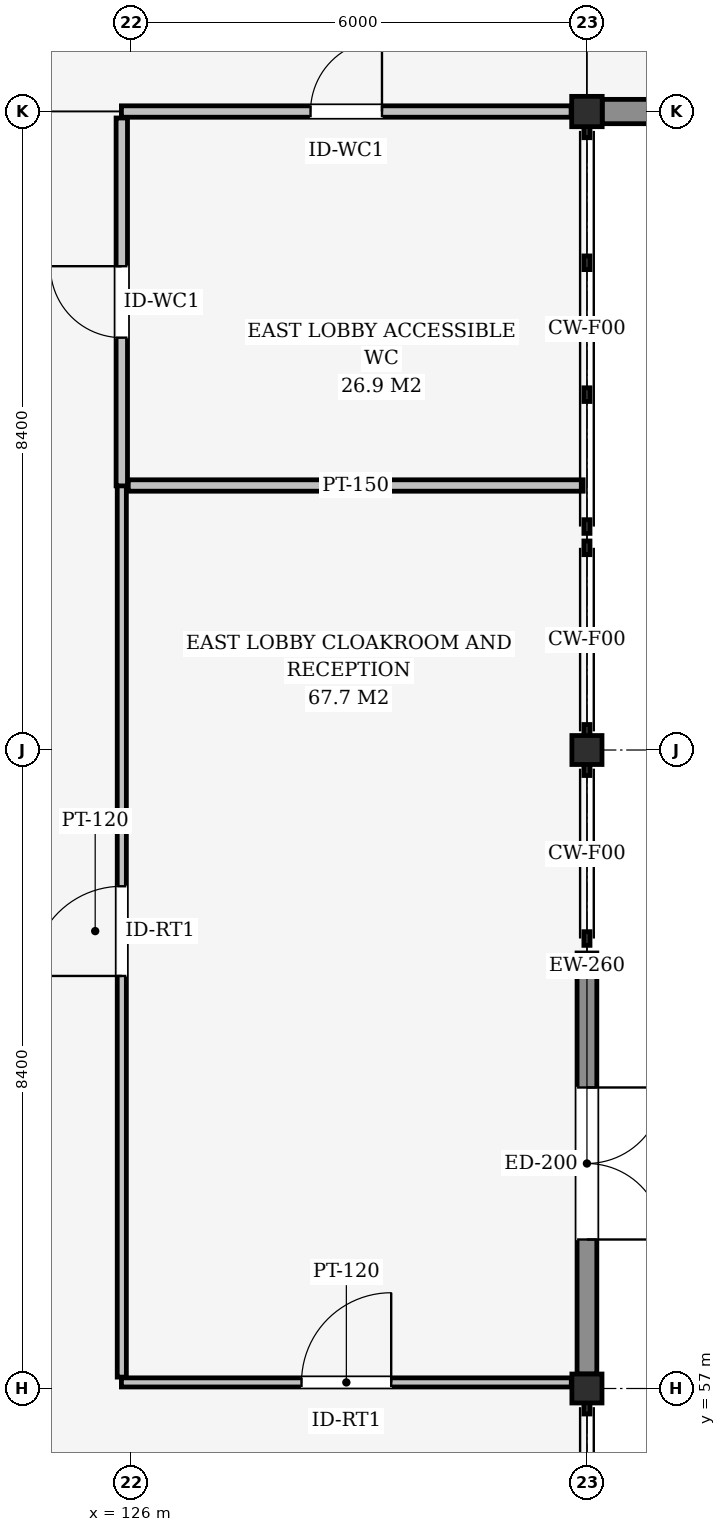
"""IFC4 building model, lengths in metres.
Left out: names, types, materials, properties, quantities, classifications, styles, units other than length and angle.
Written with IfcOpenShell. Run it as: python <this file> out.ifc"""

import sys

from ifc_helpers import new_model, si_unit, direction, frame, frame_2d, origin, origin_2d, place, context, subcontext, project, spatial, rectangle, i_section, extrude, element, fill, save


model = new_model("IFC4")
c1 = context("Model", 3, precision=1e-05, world=origin(), true_north=direction((0.0, 1.0)))
c2 = subcontext(c1, "Body", "Model", "MODEL_VIEW")
j1 = project(units=[si_unit("LENGTHUNIT", "METRE"), si_unit("PLANEANGLEUNIT", "RADIAN")], contexts=[c1])
p1 = place(None, origin())
s1 = spatial("IfcSite", under=j1, at=p1, CompositionType="ELEMENT")
p2 = place(p1, origin())
s2 = spatial("IfcBuilding", under=s1, at=p2, CompositionType="ELEMENT")
p3 = place(p2, origin())
s3 = spatial("IfcBuildingStorey", under=s2, at=p3, CompositionType="ELEMENT", Elevation=0.0)
p4 = place(p3, frame((132.0, 73.8, 0.0), z_axis=(0.0, 0.0, 1.0), x_axis=(1.0, 0.0, 0.0)))
e1 = element("IfcColumn", 1, at=p4, inside=s3, PredefinedType="COLUMN", context=c2, shape_type="SweptSolid", body=[
    extrude(i_section(OverallWidth=0.401, OverallDepth=0.399, WebThickness=0.025, FlangeThickness=0.04, at=origin_2d()), origin(), (0.0, 0.0, 1.0), 4.8),
])
for number, where, z_axis, x_axis in (
    (2, (132.0, 57.0, 0.0), (0.0, 0.0, 1.0), (1.0, 0.0, 0.0)),
    (3, (132.0, 65.4, 0.0), (0.0, 0.0, 1.0), (1.0, 0.0, 0.0)),
):
    element("IfcColumn", number, at=place(p3, frame(where, z_axis=z_axis, x_axis=x_axis)), inside=s3, PredefinedType="COLUMN", context=c2, shape_type="SweptSolid", body=[
        extrude(i_section(OverallWidth=0.396, OverallDepth=0.381, WebThickness=0.019, FlangeThickness=0.03, at=origin_2d()), origin(), (0.0, 0.0, 1.0), 4.8),
    ])
p5 = place(p3, frame((143.575, 73.8, 0.0), z_axis=(0.0, 0.0, 1.0), x_axis=(-1.0, 0.0, 0.0)))
e4 = element("IfcWall", 4, at=p5, inside=s3, PredefinedType="SOLIDWALL", context=c2, shape_type="SweptSolid", body=[
    extrude(rectangle(XDim=11.375, YDim=0.32, at=frame_2d((5.687, 0.0))), origin(), (0.0, 0.0, 1.0), 3.978),
])
p6 = place(p5, frame((4.687, 0.0, 0.0)))
e5 = element("IfcOpeningElement", 5, at=p6, cuts=e4, PredefinedType="OPENING", context=c2, shape_type="SweptSolid", body=[
    extrude(rectangle(XDim=2.0, YDim=2.4, at=frame_2d((1.0, 1.2))), frame((0.0, 0.17, 0.0), z_axis=(0.0, -1.0, 0.0), x_axis=(1.0, 0.0, 0.0)), (0.0, 0.0, 1.0), 0.34),
])
p7 = place(p3, frame((132.0, 62.73, 0.0), z_axis=(0.0, 0.0, 1.0), x_axis=(0.0, -1.0, 0.0)))
e6 = element("IfcWall", 6, at=p7, inside=s3, PredefinedType="SOLIDWALL", context=c2, shape_type="SweptSolid", body=[
    extrude(rectangle(XDim=5.54, YDim=0.26, at=frame_2d((2.77, 0.0))), origin(), (0.0, 0.0, 1.0), 3.828),
])
p8 = place(p7, frame((1.77, 0.0, 0.0)))
e7 = element("IfcOpeningElement", 7, at=p8, cuts=e6, PredefinedType="OPENING", context=c2, shape_type="SweptSolid", body=[
    extrude(rectangle(XDim=2.0, YDim=2.4, at=frame_2d((1.0, 1.2))), frame((0.0, 0.14, 0.0), z_axis=(0.0, -1.0, 0.0), x_axis=(1.0, 0.0, 0.0)), (0.0, 0.0, 1.0), 0.28),
])
p9 = place(p3, frame((125.875, 73.8, 0.0), z_axis=(0.0, 0.0, 1.0), x_axis=(1.0, 0.0, 0.0)))
e8 = element("IfcWall", 8, at=p9, inside=s3, PredefinedType="PARTITIONING", context=c2, shape_type="SweptSolid", body=[
    extrude(rectangle(XDim=5.917, YDim=0.15, at=frame_2d((2.958, 0.0))), origin(), (0.0, 0.0, 1.0), 3.67),
])
p10 = place(p9, frame((2.488, 0.0, 0.0)))
e9 = element("IfcOpeningElement", 9, at=p10, cuts=e8, PredefinedType="OPENING", context=c2, shape_type="SweptSolid", body=[
    extrude(rectangle(XDim=0.94, YDim=2.1, at=frame_2d((0.47, 1.05))), frame((0.0, 0.085, 0.0), z_axis=(0.0, -1.0, 0.0), x_axis=(1.0, 0.0, 0.0)), (0.0, 0.0, 1.0), 0.17),
])
p11 = place(p3, frame((125.875, 57.08, 0.0), z_axis=(0.0, 0.0, 1.0), x_axis=(1.0, 0.0, 0.0)))
e10 = element("IfcWall", 10, at=p11, inside=s3, PredefinedType="PARTITIONING", context=c2, shape_type="SweptSolid", body=[
    extrude(rectangle(XDim=5.919, YDim=0.12, at=frame_2d((2.959, 0.0))), origin(), (0.0, 0.0, 1.0), 3.837),
])
p12 = place(p11, frame((2.369, 0.0, 0.0)))
e11 = element("IfcOpeningElement", 11, at=p12, cuts=e10, PredefinedType="OPENING", context=c2, shape_type="SweptSolid", body=[
    extrude(rectangle(XDim=1.18, YDim=2.2, at=frame_2d((0.59, 1.1))), frame((0.0, 0.07, 0.0), z_axis=(0.0, -1.0, 0.0), x_axis=(1.0, 0.0, 0.0)), (0.0, 0.0, 1.0), 0.14),
])
p13 = place(p3, frame((125.88, 57.15, 0.0), z_axis=(0.0, 0.0, 1.0), x_axis=(0.0, 1.0, 0.0)))
e12 = element("IfcWall", 12, at=p13, inside=s3, PredefinedType="PARTITIONING", context=c2, shape_type="SweptSolid", body=[
    extrude(rectangle(XDim=11.735, YDim=0.12, at=frame_2d((5.868, 0.0))), origin(), (0.0, 0.0, 1.0), 4.075),
])
p14 = place(p13, frame((5.278, 0.0, 0.0)))
e13 = element("IfcOpeningElement", 13, at=p14, cuts=e12, PredefinedType="OPENING", context=c2, shape_type="SweptSolid", body=[
    extrude(rectangle(XDim=1.18, YDim=2.2, at=frame_2d((0.59, 1.1))), frame((0.0, 0.07, 0.0), z_axis=(0.0, -1.0, 0.0), x_axis=(1.0, 0.0, 0.0)), (0.0, 0.0, 1.0), 0.14),
])
p15 = place(p3, frame((125.88, 68.875, 0.0), z_axis=(0.0, 0.0, 1.0), x_axis=(0.0, 1.0, 0.0)))
e14 = element("IfcWall", 14, at=p15, inside=s3, PredefinedType="PARTITIONING", context=c2, shape_type="SweptSolid", body=[
    extrude(rectangle(XDim=4.84, YDim=0.15, at=frame_2d((2.42, 0.0))), origin(), (0.0, 0.0, 1.0), 4.075),
])
p16 = place(p15, frame((1.95, 0.0, 0.0)))
e15 = element("IfcOpeningElement", 15, at=p16, cuts=e14, PredefinedType="OPENING", context=c2, shape_type="SweptSolid", body=[
    extrude(rectangle(XDim=0.94, YDim=2.1, at=frame_2d((0.47, 1.05))), frame((0.0, 0.085, 0.0), z_axis=(0.0, -1.0, 0.0), x_axis=(1.0, 0.0, 0.0)), (0.0, 0.0, 1.0), 0.17),
])
p17 = place(p3, frame((125.965, 68.88, 0.0), z_axis=(0.0, 0.0, 1.0), x_axis=(1.0, 0.0, 0.0)))
e16 = element("IfcWall", 16, at=p17, inside=s3, PredefinedType="PARTITIONING", context=c2, shape_type="SweptSolid", body=[
    extrude(rectangle(XDim=5.985, YDim=0.15, at=frame_2d((2.992, 0.0))), origin(), (0.0, 0.0, 1.0), 4.53),
])
p18 = place(p8, origin())
e17 = element("IfcDoor", 17, at=p18, inside=s3, OperationType="DOUBLE_DOOR_SINGLE_SWING", PredefinedType="DOOR", context=c2, shape_type="SweptSolid", body=[
    extrude(rectangle(XDim=2.0, YDim=2.4, at=frame_2d((1.0, 1.2))), frame((0.0, 0.025, 0.0), z_axis=(0.0, -1.0, 0.0), x_axis=(1.0, 0.0, 0.0)), (0.0, 0.0, 1.0), 0.05),
])
fill(e7, e17)
p19 = place(p10, origin())
e18 = element("IfcDoor", 18, at=p19, inside=s3, OperationType="SINGLE_SWING_RIGHT", PredefinedType="DOOR", context=c2, shape_type="SweptSolid", body=[
    extrude(rectangle(XDim=0.94, YDim=2.1, at=frame_2d((0.47, 1.05))), frame((0.0, 0.025, 0.0), z_axis=(0.0, -1.0, 0.0), x_axis=(1.0, 0.0, 0.0)), (0.0, 0.0, 1.0), 0.05),
])
fill(e9, e18)
p20 = place(p12, origin())
e19 = element("IfcDoor", 19, at=p20, inside=s3, OperationType="SINGLE_SWING_RIGHT", PredefinedType="DOOR", context=c2, shape_type="SweptSolid", body=[
    extrude(rectangle(XDim=1.18, YDim=2.2, at=frame_2d((0.59, 1.1))), frame((0.0, 0.025, 0.0), z_axis=(0.0, -1.0, 0.0), x_axis=(1.0, 0.0, 0.0)), (0.0, 0.0, 1.0), 0.05),
])
fill(e11, e19)
p21 = place(p14, origin())
e20 = element("IfcDoor", 20, at=p21, inside=s3, OperationType="SINGLE_SWING_LEFT", PredefinedType="DOOR", context=c2, shape_type="SweptSolid", body=[
    extrude(rectangle(XDim=1.18, YDim=2.2, at=frame_2d((0.59, 1.1))), frame((0.0, 0.025, 0.0), z_axis=(0.0, -1.0, 0.0), x_axis=(1.0, 0.0, 0.0)), (0.0, 0.0, 1.0), 0.05),
])
fill(e13, e20)
p22 = place(p16, origin())
e21 = element("IfcDoor", 21, at=p22, inside=s3, OperationType="SINGLE_SWING_RIGHT", PredefinedType="DOOR", context=c2, shape_type="SweptSolid", body=[
    extrude(rectangle(XDim=0.94, YDim=2.1, at=frame_2d((0.47, 1.05))), frame((0.0, 0.025, 0.0), z_axis=(0.0, -1.0, 0.0), x_axis=(1.0, 0.0, 0.0)), (0.0, 0.0, 1.0), 0.05),
])
fill(e15, e21)
save(model, sys.argv[1])
